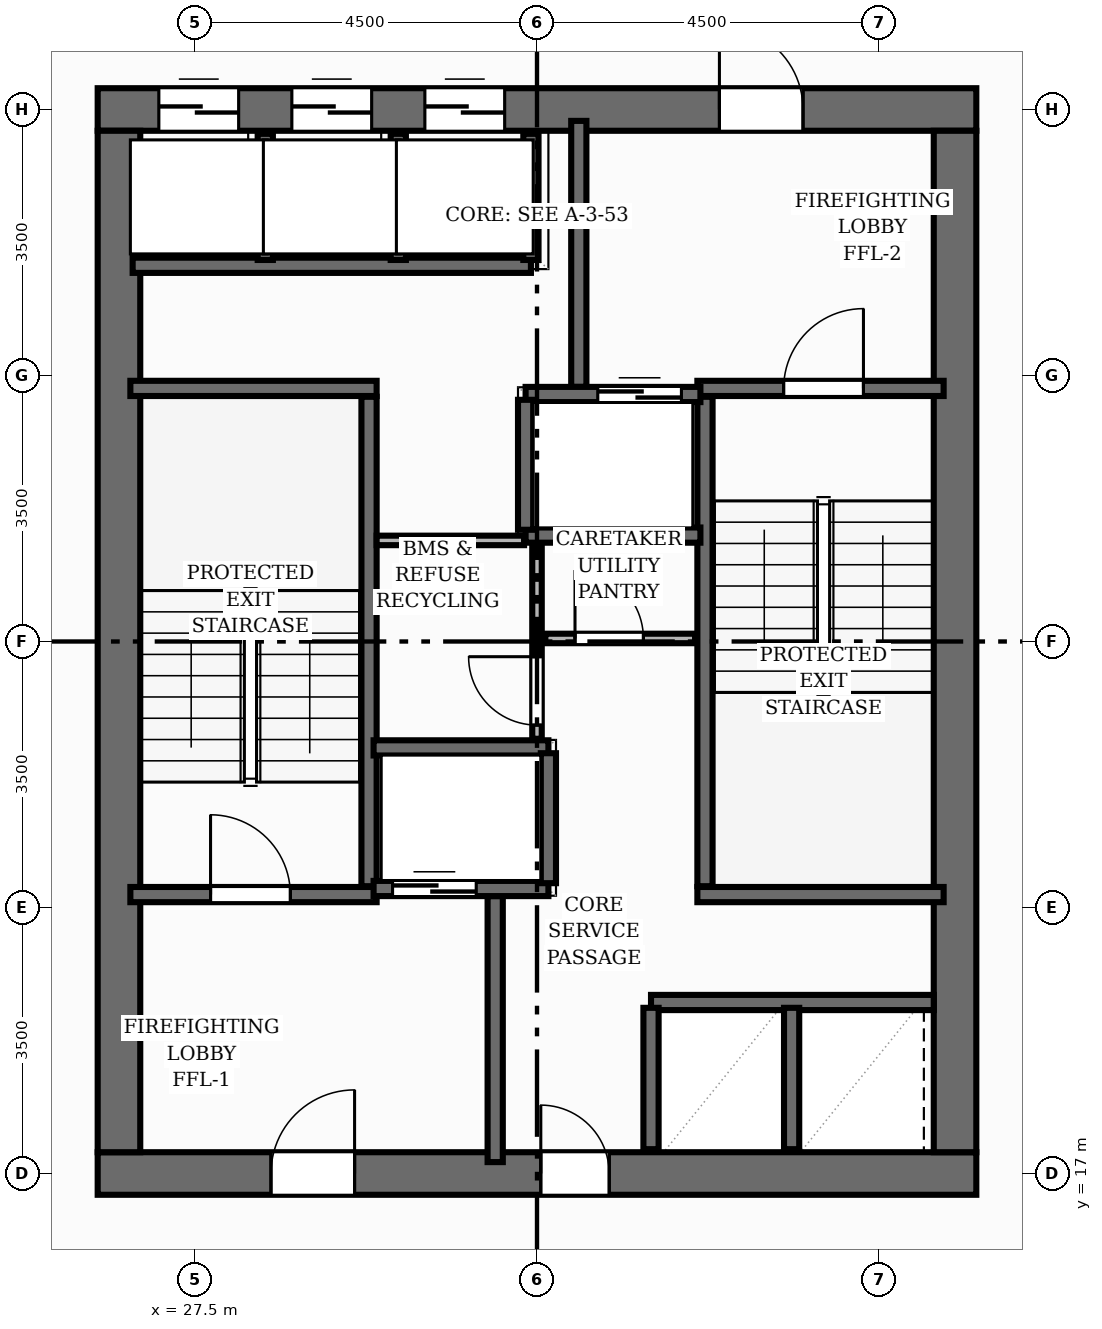
"""IFC4 building model, lengths in metres.
Left out: names, types, materials, properties, quantities, classifications, styles, units other than length and angle.
Written with IfcOpenShell. Run it as: python <this file> out.ifc"""

import sys

from ifc_helpers import new_model, si_unit, direction, frame, frame_2d, origin, place, context, subcontext, project, spatial, rectangle, extrude, element, fill, save


model = new_model("IFC4")
c1 = context("Model", 3, precision=1e-05, world=origin(), true_north=direction((0.0, 1.0)))
c2 = subcontext(c1, "Body", "Model", "MODEL_VIEW")
j1 = project(units=[si_unit("LENGTHUNIT", "METRE"), si_unit("PLANEANGLEUNIT", "RADIAN")], contexts=[c1])
p1 = place(None, origin())
s1 = spatial("IfcSite", under=j1, at=p1, CompositionType="ELEMENT")
p2 = place(p1, origin())
s2 = spatial("IfcBuilding", under=s1, at=p2, CompositionType="ELEMENT")
p3 = place(p2, frame((0.0, 0.0, 220.64)))
s3 = spatial("IfcBuildingStorey", under=s2, at=p3, CompositionType="ELEMENT", Elevation=220.64)
p4 = place(p3, frame((26.22, 17.0, 0.0), z_axis=(0.0, 0.0, 1.0), x_axis=(1.0, 0.0, 0.0)))
e1 = element("IfcWall", 1, at=p4, inside=s3, PredefinedType="SHEAR", context=c2, shape_type="SweptSolid", body=[
    extrude(rectangle(XDim=11.56, YDim=0.56, at=frame_2d((5.78, 0.0))), origin(), (0.0, 0.0, 1.0), 3.2),
])
p5 = place(p4, frame((2.28, 0.0, 0.0)))
e2 = element("IfcOpeningElement", 2, at=p5, cuts=e1, PredefinedType="OPENING", context=c2, shape_type="SweptSolid", body=[
    extrude(rectangle(XDim=1.1, YDim=2.15, at=frame_2d((0.55, 1.075))), frame((0.0, 0.29, 0.0), z_axis=(0.0, -1.0, 0.0), x_axis=(1.0, 0.0, 0.0)), (0.0, 0.0, 1.0), 0.58),
])
p6 = place(p4, frame((5.83, 0.0, 0.0)))
e3 = element("IfcOpeningElement", 3, at=p6, cuts=e1, PredefinedType="OPENING", context=c2, shape_type="SweptSolid", body=[
    extrude(rectangle(XDim=0.9, YDim=2.1, at=frame_2d((0.45, 1.05))), frame((0.0, 0.29, 0.0), z_axis=(0.0, -1.0, 0.0), x_axis=(1.0, 0.0, 0.0)), (0.0, 0.0, 1.0), 0.58),
])
p7 = place(p3, frame((26.22, 31.0, 0.0), z_axis=(0.0, 0.0, 1.0), x_axis=(1.0, 0.0, 0.0)))
e4 = element("IfcWall", 4, at=p7, inside=s3, PredefinedType="SHEAR", context=c2, shape_type="SweptSolid", body=[
    extrude(rectangle(XDim=11.56, YDim=0.56, at=frame_2d((5.78, 0.0))), origin(), (0.0, 0.0, 1.0), 3.2),
])
p8 = place(p7, frame((8.18, 0.0, 0.0)))
e5 = element("IfcOpeningElement", 5, at=p8, cuts=e4, PredefinedType="OPENING", context=c2, shape_type="SweptSolid", body=[
    extrude(rectangle(XDim=1.1, YDim=2.15, at=frame_2d((0.55, 1.075))), frame((0.0, 0.29, 0.0), z_axis=(0.0, -1.0, 0.0), x_axis=(1.0, 0.0, 0.0)), (0.0, 0.0, 1.0), 0.58),
])
p9 = place(p7, frame((0.805, 0.0, 0.0)))
e6 = element("IfcOpeningElement", 6, at=p9, cuts=e4, PredefinedType="OPENING", context=c2, shape_type="SweptSolid", body=[
    extrude(rectangle(XDim=1.05, YDim=2.15, at=frame_2d((0.525, 1.075))), frame((0.0, 0.29, 0.0), z_axis=(0.0, -1.0, 0.0), x_axis=(1.0, 0.0, 0.0)), (0.0, 0.0, 1.0), 0.58),
])
p10 = place(p7, frame((2.555, 0.0, 0.0)))
e7 = element("IfcOpeningElement", 7, at=p10, cuts=e4, PredefinedType="OPENING", context=c2, shape_type="SweptSolid", body=[
    extrude(rectangle(XDim=1.05, YDim=2.15, at=frame_2d((0.525, 1.075))), frame((0.0, 0.29, 0.0), z_axis=(0.0, -1.0, 0.0), x_axis=(1.0, 0.0, 0.0)), (0.0, 0.0, 1.0), 0.58),
])
p11 = place(p7, frame((4.305, 0.0, 0.0)))
e8 = element("IfcOpeningElement", 8, at=p11, cuts=e4, PredefinedType="OPENING", context=c2, shape_type="SweptSolid", body=[
    extrude(rectangle(XDim=1.05, YDim=2.15, at=frame_2d((0.525, 1.075))), frame((0.0, 0.29, 0.0), z_axis=(0.0, -1.0, 0.0), x_axis=(1.0, 0.0, 0.0)), (0.0, 0.0, 1.0), 0.58),
])
for number, where, z_axis, x_axis in (
    (9, (26.5, 17.28, 0.0), (0.0, 0.0, 1.0), (0.0, 1.0, 0.0)),
    (10, (37.5, 17.28, 0.0), (0.0, 0.0, 1.0), (0.0, 1.0, 0.0)),
):
    element("IfcWall", number, at=place(p3, frame(where, z_axis=z_axis, x_axis=x_axis)), inside=s3, PredefinedType="SHEAR", context=c2, shape_type="SweptSolid", body=[
        extrude(rectangle(XDim=13.44, YDim=0.56, at=frame_2d((6.72, 0.0))), origin(), (0.0, 0.0, 1.0), 3.2),
    ])
p12 = place(p3, frame((29.79, 20.78, 0.0), z_axis=(0.0, 0.0, 1.0), x_axis=(0.0, 1.0, 0.0)))
e11 = element("IfcWall", 11, at=p12, inside=s3, PredefinedType="SHEAR", context=c2, shape_type="SweptSolid", body=[
    extrude(rectangle(XDim=6.44, YDim=0.2, at=frame_2d((3.22, 0.0))), origin(), (0.0, 0.0, 1.0), 3.2),
])
p13 = place(p3, frame((26.65, 27.33, 0.0), z_axis=(0.0, 0.0, 1.0), x_axis=(1.0, 0.0, 0.0)))
e12 = element("IfcWall", 12, at=p13, inside=s3, PredefinedType="SHEAR", context=c2, shape_type="SweptSolid", body=[
    extrude(rectangle(XDim=3.24, YDim=0.2, at=frame_2d((1.62, 0.0))), origin(), (0.0, 0.0, 1.0), 3.2),
])
p14 = place(p3, frame((26.65, 20.67, 0.0), z_axis=(0.0, 0.0, 1.0), x_axis=(1.0, 0.0, 0.0)))
e13 = element("IfcWall", 13, at=p14, inside=s3, PredefinedType="SHEAR", context=c2, shape_type="SweptSolid", body=[
    extrude(rectangle(XDim=3.24, YDim=0.2, at=frame_2d((1.62, 0.0))), origin(), (0.0, 0.0, 1.0), 3.2),
])
p15 = place(p14, frame((1.055, 0.0, 0.0)))
e14 = element("IfcOpeningElement", 14, at=p15, cuts=e13, PredefinedType="OPENING", context=c2, shape_type="SweptSolid", body=[
    extrude(rectangle(XDim=1.05, YDim=2.15, at=frame_2d((0.525, 1.075))), frame((0.0, 0.11, 0.0), z_axis=(0.0, -1.0, 0.0), x_axis=(1.0, 0.0, 0.0)), (0.0, 0.0, 1.0), 0.22),
])
p16 = place(p3, frame((34.21, 20.78, 0.0), z_axis=(0.0, 0.0, 1.0), x_axis=(0.0, 1.0, 0.0)))
e15 = element("IfcWall", 15, at=p16, inside=s3, PredefinedType="SHEAR", context=c2, shape_type="SweptSolid", body=[
    extrude(rectangle(XDim=6.44, YDim=0.2, at=frame_2d((3.22, 0.0))), origin(), (0.0, 0.0, 1.0), 3.2),
])
p17 = place(p3, frame((34.11, 20.67, 0.0), z_axis=(0.0, 0.0, 1.0), x_axis=(1.0, 0.0, 0.0)))
e16 = element("IfcWall", 16, at=p17, inside=s3, PredefinedType="SHEAR", context=c2, shape_type="SweptSolid", body=[
    extrude(rectangle(XDim=3.24, YDim=0.2, at=frame_2d((1.62, 0.0))), origin(), (0.0, 0.0, 1.0), 3.2),
])
p18 = place(p3, frame((34.11, 27.33, 0.0), z_axis=(0.0, 0.0, 1.0), x_axis=(1.0, 0.0, 0.0)))
e17 = element("IfcWall", 17, at=p18, inside=s3, PredefinedType="SHEAR", context=c2, shape_type="SweptSolid", body=[
    extrude(rectangle(XDim=3.24, YDim=0.2, at=frame_2d((1.62, 0.0))), origin(), (0.0, 0.0, 1.0), 3.2),
])
p19 = place(p18, frame((1.135, 0.0, 0.0)))
e18 = element("IfcOpeningElement", 18, at=p19, cuts=e17, PredefinedType="OPENING", context=c2, shape_type="SweptSolid", body=[
    extrude(rectangle(XDim=1.05, YDim=2.15, at=frame_2d((0.525, 1.075))), frame((0.0, 0.11, 0.0), z_axis=(0.0, -1.0, 0.0), x_axis=(1.0, 0.0, 0.0)), (0.0, 0.0, 1.0), 0.22),
])
for number, where, z_axis, x_axis in (
    (19, (31.45, 17.15, 0.0), (0.0, 0.0, 1.0), (0.0, 1.0, 0.0)),
    (20, (32.55, 27.35, 0.0), (0.0, 0.0, 1.0), (0.0, 1.0, 0.0)),
):
    element("IfcWall", number, at=place(p3, frame(where, z_axis=z_axis, x_axis=x_axis)), inside=s3, PredefinedType="SHEAR", context=c2, shape_type="SweptSolid", body=[
        extrude(rectangle(XDim=3.5, YDim=0.2, at=frame_2d((1.75, 0.0))), origin(), (0.0, 0.0, 1.0), 3.2),
    ])
p20 = place(p3, frame((29.85, 20.75, 0.0), z_axis=(0.0, 0.0, 1.0), x_axis=(1.0, 0.0, 0.0)))
e21 = element("IfcWall", 21, at=p20, inside=s3, PredefinedType="SHEAR", context=c2, shape_type="SweptSolid", body=[
    extrude(rectangle(XDim=2.3, YDim=0.2, at=frame_2d((1.15, 0.0))), origin(), (0.0, 0.0, 1.0), 3.2),
])
p21 = place(p20, frame((0.25, 0.0, 0.0)))
e22 = element("IfcOpeningElement", 22, at=p21, cuts=e21, PredefinedType="OPENING", context=c2, shape_type="SweptSolid", body=[
    extrude(rectangle(XDim=1.1, YDim=2.15, at=frame_2d((0.55, 1.075))), frame((0.0, 0.11, 0.0), z_axis=(0.0, -1.0, 0.0), x_axis=(1.0, 0.0, 0.0)), (0.0, 0.0, 1.0), 0.22),
])
p22 = place(p3, frame((29.85, 22.6, 0.0), z_axis=(0.0, 0.0, 1.0), x_axis=(1.0, 0.0, 0.0)))
e23 = element("IfcWall", 23, at=p22, inside=s3, PredefinedType="SHEAR", context=c2, shape_type="SweptSolid", body=[
    extrude(rectangle(XDim=2.3, YDim=0.2, at=frame_2d((1.15, 0.0))), origin(), (0.0, 0.0, 1.0), 3.2),
])
p23 = place(p3, frame((32.15, 20.82, 0.0), z_axis=(0.0, 0.0, 1.0), x_axis=(0.0, 1.0, 0.0)))
e24 = element("IfcWall", 24, at=p23, inside=s3, PredefinedType="SHEAR", context=c2, shape_type="SweptSolid", body=[
    extrude(rectangle(XDim=1.71, YDim=0.2, at=frame_2d((0.855, 0.0))), origin(), (0.0, 0.0, 1.0), 3.2),
])
p24 = place(p3, frame((31.85, 27.25, 0.0), z_axis=(0.0, 0.0, 1.0), x_axis=(1.0, 0.0, 0.0)))
e25 = element("IfcWall", 25, at=p24, inside=s3, PredefinedType="SHEAR", context=c2, shape_type="SweptSolid", body=[
    extrude(rectangle(XDim=2.3, YDim=0.2, at=frame_2d((1.15, 0.0))), origin(), (0.0, 0.0, 1.0), 3.2),
])
p25 = place(p24, frame((0.95, 0.0, 0.0)))
e26 = element("IfcOpeningElement", 26, at=p25, cuts=e25, PredefinedType="OPENING", context=c2, shape_type="SweptSolid", body=[
    extrude(rectangle(XDim=1.1, YDim=2.15, at=frame_2d((0.55, 1.075))), frame((0.0, 0.11, 0.0), z_axis=(0.0, -1.0, 0.0), x_axis=(1.0, 0.0, 0.0)), (0.0, 0.0, 1.0), 0.22),
])
p26 = place(p3, frame((31.85, 25.4, 0.0), z_axis=(0.0, 0.0, 1.0), x_axis=(1.0, 0.0, 0.0)))
e27 = element("IfcWall", 27, at=p26, inside=s3, PredefinedType="SHEAR", context=c2, shape_type="SweptSolid", body=[
    extrude(rectangle(XDim=2.3, YDim=0.2, at=frame_2d((1.15, 0.0))), origin(), (0.0, 0.0, 1.0), 3.2),
])
p27 = place(p3, frame((31.85, 25.47, 0.0), z_axis=(0.0, 0.0, 1.0), x_axis=(0.0, 1.0, 0.0)))
e28 = element("IfcWall", 28, at=p27, inside=s3, PredefinedType="SHEAR", context=c2, shape_type="SweptSolid", body=[
    extrude(rectangle(XDim=1.71, YDim=0.2, at=frame_2d((0.855, 0.0))), origin(), (0.0, 0.0, 1.0), 3.2),
])
p28 = place(p3, frame((26.68, 28.95, 0.0), z_axis=(0.0, 0.0, 1.0), x_axis=(1.0, 0.0, 0.0)))
e29 = element("IfcWall", 29, at=p28, inside=s3, PredefinedType="SHEAR", context=c2, shape_type="SweptSolid", body=[
    extrude(rectangle(XDim=5.24, YDim=0.2, at=frame_2d((2.62, 0.0))), origin(), (0.0, 0.0, 1.0), 3.2),
])
for number, where, z_axis, x_axis in (
    (30, (31.92, 29.02, 0.0), (0.0, 0.0, 1.0), (0.0, 1.0, 0.0)),
    (31, (28.425, 29.02, 0.0), (0.0, 0.0, 1.0), (0.0, 1.0, 0.0)),
    (32, (30.175, 29.02, 0.0), (0.0, 0.0, 1.0), (0.0, 1.0, 0.0)),
):
    element("IfcWall", number, at=place(p3, frame(where, z_axis=z_axis, x_axis=x_axis)), inside=s3, PredefinedType="SHEAR", context=c2, shape_type="SweptSolid", body=[
        extrude(rectangle(XDim=1.66, YDim=0.2, at=frame_2d((0.83, 0.0))), origin(), (0.0, 0.0, 1.0), 3.2),
    ])
p29 = place(p3, frame((33.5, 19.25, 0.0), z_axis=(0.0, 0.0, 1.0), x_axis=(1.0, 0.0, 0.0)))
e33 = element("IfcWall", 33, at=p29, inside=s3, PredefinedType="SHEAR", context=c2, shape_type="SweptSolid", body=[
    extrude(rectangle(XDim=3.72, YDim=0.2, at=frame_2d((1.86, 0.0))), origin(), (0.0, 0.0, 1.0), 3.2),
])
for number, where, z_axis, x_axis in (
    (34, (33.5, 17.32, 0.0), (0.0, 0.0, 1.0), (0.0, 1.0, 0.0)),
    (35, (35.35, 17.32, 0.0), (0.0, 0.0, 1.0), (0.0, 1.0, 0.0)),
):
    element("IfcWall", number, at=place(p3, frame(where, z_axis=z_axis, x_axis=x_axis)), inside=s3, PredefinedType="SHEAR", context=c2, shape_type="SweptSolid", body=[
        extrude(rectangle(XDim=1.86, YDim=0.2, at=frame_2d((0.93, 0.0))), origin(), (0.0, 0.0, 1.0), 3.2),
    ])
p30 = place(p3, frame((32.0, 22.72, 0.0), z_axis=(0.0, 0.0, 1.0), x_axis=(0.0, 1.0, 0.0)))
e36 = element("IfcWall", 36, at=p30, inside=s3, PredefinedType="PARTITIONING", context=c2, shape_type="SweptSolid", body=[
    extrude(rectangle(XDim=2.52, YDim=0.125, at=frame_2d((1.26, 0.0))), origin(), (0.0, 0.0, 1.0), 2.955),
])
p31 = place(p30, frame((0.18, 0.0, 0.0)))
e37 = element("IfcOpeningElement", 37, at=p31, cuts=e36, PredefinedType="OPENING", context=c2, shape_type="SweptSolid", body=[
    extrude(rectangle(XDim=0.9, YDim=2.1, at=frame_2d((0.45, 1.05))), frame((0.0, 0.073, 0.0), z_axis=(0.0, -1.0, 0.0), x_axis=(1.0, 0.0, 0.0)), (0.0, 0.0, 1.0), 0.145),
])
p32 = place(p3, frame((32.11, 24.04, 0.0), z_axis=(0.0, 0.0, 1.0), x_axis=(1.0, 0.0, 0.0)))
e38 = element("IfcWall", 38, at=p32, inside=s3, PredefinedType="PARTITIONING", context=c2, shape_type="SweptSolid", body=[
    extrude(rectangle(XDim=1.97, YDim=0.125, at=frame_2d((0.985, 0.0))), origin(), (0.0, 0.0, 1.0), 2.955),
])
p33 = place(p32, frame((0.39, 0.0, 0.0)))
e39 = element("IfcOpeningElement", 39, at=p33, cuts=e38, PredefinedType="OPENING", context=c2, shape_type="SweptSolid", body=[
    extrude(rectangle(XDim=0.9, YDim=2.1, at=frame_2d((0.45, 1.05))), frame((0.0, 0.073, 0.0), z_axis=(0.0, -1.0, 0.0), x_axis=(1.0, 0.0, 0.0)), (0.0, 0.0, 1.0), 0.145),
])
p34 = place(p3, frame((29.89, 25.33, 0.0), z_axis=(0.0, 0.0, 1.0), x_axis=(1.0, 0.0, 0.0)))
e40 = element("IfcWall", 40, at=p34, inside=s3, PredefinedType="PARTITIONING", context=c2, shape_type="SweptSolid", body=[
    extrude(rectangle(XDim=1.94, YDim=0.125, at=frame_2d((0.97, 0.0))), origin(), (0.0, 0.0, 1.0), 2.955),
])
p35 = place(p15, origin())
e41 = element("IfcDoor", 41, at=p35, inside=s3, OperationType="SINGLE_SWING_LEFT", PredefinedType="DOOR", context=c2, shape_type="SweptSolid", body=[
    extrude(rectangle(XDim=1.05, YDim=2.15, at=frame_2d((0.525, 1.075))), frame((0.0, 0.025, 0.0), z_axis=(0.0, -1.0, 0.0), x_axis=(1.0, 0.0, 0.0)), (0.0, 0.0, 1.0), 0.05),
])
fill(e14, e41)
p36 = place(p19, origin())
e42 = element("IfcDoor", 42, at=p36, inside=s3, OperationType="SINGLE_SWING_RIGHT", PredefinedType="DOOR", context=c2, shape_type="SweptSolid", body=[
    extrude(rectangle(XDim=1.05, YDim=2.15, at=frame_2d((0.525, 1.075))), frame((0.0, 0.025, 0.0), z_axis=(0.0, -1.0, 0.0), x_axis=(1.0, 0.0, 0.0)), (0.0, 0.0, 1.0), 0.05),
])
fill(e18, e42)
p37 = place(p5, origin())
e43 = element("IfcDoor", 43, at=p37, inside=s3, OperationType="SINGLE_SWING_RIGHT", PredefinedType="DOOR", context=c2, shape_type="SweptSolid", body=[
    extrude(rectangle(XDim=1.1, YDim=2.15, at=frame_2d((0.55, 1.075))), frame((0.0, 0.025, 0.0), z_axis=(0.0, -1.0, 0.0), x_axis=(1.0, 0.0, 0.0)), (0.0, 0.0, 1.0), 0.05),
])
fill(e2, e43)
p38 = place(p8, origin())
e44 = element("IfcDoor", 44, at=p38, inside=s3, OperationType="SINGLE_SWING_LEFT", PredefinedType="DOOR", context=c2, shape_type="SweptSolid", body=[
    extrude(rectangle(XDim=1.1, YDim=2.15, at=frame_2d((0.55, 1.075))), frame((0.0, 0.025, 0.0), z_axis=(0.0, -1.0, 0.0), x_axis=(1.0, 0.0, 0.0)), (0.0, 0.0, 1.0), 0.05),
])
fill(e5, e44)
p39 = place(p21, origin())
e45 = element("IfcDoor", 45, at=p39, inside=s3, OperationType="DOUBLE_DOOR_SLIDING", PredefinedType="DOOR", context=c2, shape_type="SweptSolid", body=[
    extrude(rectangle(XDim=1.1, YDim=2.15, at=frame_2d((0.55, 1.075))), frame((0.0, 0.025, 0.0), z_axis=(0.0, -1.0, 0.0), x_axis=(1.0, 0.0, 0.0)), (0.0, 0.0, 1.0), 0.05),
])
fill(e22, e45)
p40 = place(p25, origin())
e46 = element("IfcDoor", 46, at=p40, inside=s3, OperationType="DOUBLE_DOOR_SLIDING", PredefinedType="DOOR", context=c2, shape_type="SweptSolid", body=[
    extrude(rectangle(XDim=1.1, YDim=2.15, at=frame_2d((0.55, 1.075))), frame((0.0, 0.025, 0.0), z_axis=(0.0, -1.0, 0.0), x_axis=(1.0, 0.0, 0.0)), (0.0, 0.0, 1.0), 0.05),
])
fill(e26, e46)
p41 = place(p9, origin())
e47 = element("IfcDoor", 47, at=p41, inside=s3, OperationType="DOUBLE_DOOR_SLIDING", PredefinedType="DOOR", context=c2, shape_type="SweptSolid", body=[
    extrude(rectangle(XDim=1.05, YDim=2.15, at=frame_2d((0.525, 1.075))), frame((0.0, 0.025, 0.0), z_axis=(0.0, -1.0, 0.0), x_axis=(1.0, 0.0, 0.0)), (0.0, 0.0, 1.0), 0.05),
])
fill(e6, e47)
p42 = place(p10, origin())
e48 = element("IfcDoor", 48, at=p42, inside=s3, OperationType="DOUBLE_DOOR_SLIDING", PredefinedType="DOOR", context=c2, shape_type="SweptSolid", body=[
    extrude(rectangle(XDim=1.05, YDim=2.15, at=frame_2d((0.525, 1.075))), frame((0.0, 0.025, 0.0), z_axis=(0.0, -1.0, 0.0), x_axis=(1.0, 0.0, 0.0)), (0.0, 0.0, 1.0), 0.05),
])
fill(e7, e48)
p43 = place(p11, origin())
e49 = element("IfcDoor", 49, at=p43, inside=s3, OperationType="DOUBLE_DOOR_SLIDING", PredefinedType="DOOR", context=c2, shape_type="SweptSolid", body=[
    extrude(rectangle(XDim=1.05, YDim=2.15, at=frame_2d((0.525, 1.075))), frame((0.0, 0.025, 0.0), z_axis=(0.0, -1.0, 0.0), x_axis=(1.0, 0.0, 0.0)), (0.0, 0.0, 1.0), 0.05),
])
fill(e8, e49)
p44 = place(p6, origin())
e50 = element("IfcDoor", 50, at=p44, inside=s3, OperationType="SINGLE_SWING_LEFT", PredefinedType="DOOR", context=c2, shape_type="SweptSolid", body=[
    extrude(rectangle(XDim=0.9, YDim=2.1, at=frame_2d((0.45, 1.05))), frame((0.0, 0.025, 0.0), z_axis=(0.0, -1.0, 0.0), x_axis=(1.0, 0.0, 0.0)), (0.0, 0.0, 1.0), 0.05),
])
fill(e3, e50)
p45 = place(p33, origin())
e51 = element("IfcDoor", 51, at=p45, inside=s3, OperationType="SINGLE_SWING_LEFT", PredefinedType="DOOR", context=c2, shape_type="SweptSolid", body=[
    extrude(rectangle(XDim=0.9, YDim=2.1, at=frame_2d((0.45, 1.05))), frame((0.0, 0.025, 0.0), z_axis=(0.0, -1.0, 0.0), x_axis=(1.0, 0.0, 0.0)), (0.0, 0.0, 1.0), 0.05),
])
fill(e39, e51)
p46 = place(p31, origin())
e52 = element("IfcDoor", 52, at=p46, inside=s3, OperationType="SINGLE_SWING_RIGHT", PredefinedType="DOOR", context=c2, shape_type="SweptSolid", body=[
    extrude(rectangle(XDim=0.9, YDim=2.1, at=frame_2d((0.45, 1.05))), frame((0.0, 0.025, 0.0), z_axis=(0.0, -1.0, 0.0), x_axis=(1.0, 0.0, 0.0)), (0.0, 0.0, 1.0), 0.05),
])
fill(e37, e52)
save(model, sys.argv[1])
